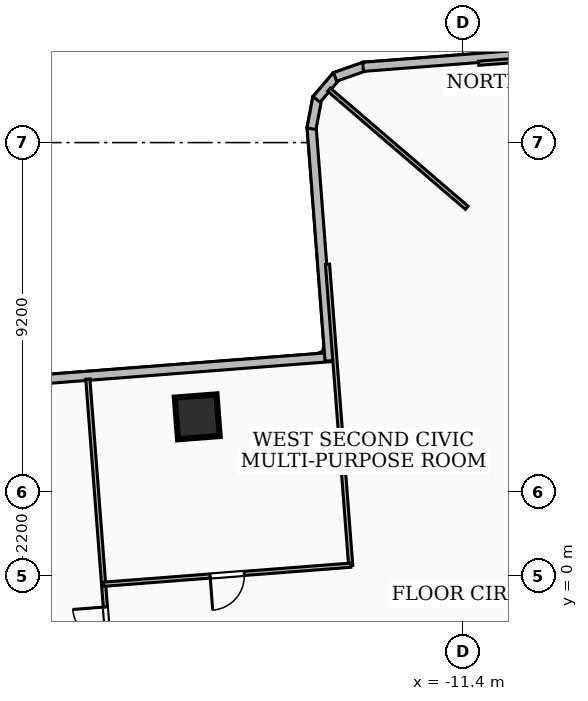
"""IFC4 building model, lengths in metres.
Left out: names, types, materials, properties, quantities, classifications, styles, units other than length and angle.
Written with IfcOpenShell. Run it as: python <this file> out.ifc"""

import sys

from ifc_helpers import new_model, si_unit, direction, frame, frame_2d, origin, origin_2d, place, context, subcontext, project, spatial, rectangle, extrude, element, fill, save


model = new_model("IFC4")
c1 = context("Model", 3, precision=1e-05, world=origin(), true_north=direction((0.0, 1.0)))
c2 = subcontext(c1, "Body", "Model", "MODEL_VIEW")
j1 = project(units=[si_unit("LENGTHUNIT", "METRE"), si_unit("PLANEANGLEUNIT", "RADIAN")], contexts=[c1])
p1 = place(None, origin())
s1 = spatial("IfcSite", under=j1, at=p1, CompositionType="ELEMENT")
p2 = place(p1, origin())
s2 = spatial("IfcBuilding", under=s1, at=p2, CompositionType="ELEMENT")
p3 = place(p2, frame((0.0, 0.0, 56.88)))
s3 = spatial("IfcBuildingStorey", under=s2, at=p3, CompositionType="ELEMENT", Elevation=56.88)
p4 = place(p3, frame((-18.391, 4.184, 0.0), z_axis=(0.0, 0.0, 1.0), x_axis=(0.997052752227, 0.076719028127, 0.0)))
e1 = element("IfcColumn", 1, at=p4, inside=s3, PredefinedType="COLUMN", context=c2, shape_type="SweptSolid", body=[
    extrude(rectangle(XDim=1.1, YDim=1.1, at=origin_2d()), origin(), (0.0, 0.0, 1.0), 3.6),
])
p5 = place(p3, frame((-31.645, 4.465, 0.0), z_axis=(0.0, 0.0, 1.0), x_axis=(0.997051676532, 0.076733006752, 0.0)))
e2 = element("IfcWall", 2, at=p5, inside=s3, PredefinedType="SOLIDWALL", context=c2, shape_type="SweptSolid", body=[
    extrude(rectangle(XDim=16.876, YDim=0.24, at=frame_2d((8.438, 0.0))), origin(), (0.0, 0.0, 1.0), 3.32),
])
p6 = place(p5, frame((1.1, 0.0, 0.85)))
e3 = element("IfcOpeningElement", 3, at=p6, cuts=e2, PredefinedType="OPENING", context=c2, shape_type="SweptSolid", body=[
    extrude(rectangle(XDim=2.4, YDim=1.65, at=frame_2d((1.2, 0.825))), frame((0.0, 0.13, 0.0), z_axis=(0.0, -1.0, 0.0), x_axis=(1.0, 0.0, 0.0)), (0.0, 0.0, 1.0), 0.26),
])
p7 = place(p3, frame((-14.908, 5.657, 0.0), z_axis=(0.0, 0.0, 1.0), x_axis=(-0.076778128006, 0.997048202977, 0.0)))
e4 = element("IfcWall", 4, at=p7, inside=s3, PredefinedType="SOLIDWALL", context=c2, shape_type="SweptSolid", body=[
    extrude(rectangle(XDim=6.175, YDim=0.24, at=frame_2d((3.088, 0.0))), origin(), (0.0, 0.0, 1.0), 3.32),
])
p8 = place(p3, frame((-15.385, 11.764, 0.0), z_axis=(0.0, 0.0, 1.0), x_axis=(0.185263427582, 0.982688894005, 0.0)))
e5 = element("IfcWall", 5, at=p8, inside=s3, PredefinedType="SOLIDWALL", context=c2, shape_type="SweptSolid", body=[
    extrude(rectangle(XDim=0.832, YDim=0.24, at=frame_2d((0.416, 0.0))), origin(), (0.0, 0.0, 1.0), 3.32),
])
p9 = place(p3, frame((-15.252, 12.537, 0.0), z_axis=(0.0, 0.0, 1.0), x_axis=(0.650371098657, 0.759616636226, 0.0)))
e6 = element("IfcWall", 6, at=p9, inside=s3, PredefinedType="SOLIDWALL", context=c2, shape_type="SweptSolid", body=[
    extrude(rectangle(XDim=0.813, YDim=0.24, at=frame_2d((0.407, 0.0))), origin(), (0.0, 0.0, 1.0), 3.32),
])
p10 = place(p3, frame((-14.763, 13.128, 0.0), z_axis=(0.0, 0.0, 1.0), x_axis=(0.943569376564, 0.331174926, 0.0)))
e7 = element("IfcWall", 7, at=p10, inside=s3, PredefinedType="SOLIDWALL", context=c2, shape_type="SweptSolid", body=[
    extrude(rectangle(XDim=0.831, YDim=0.24, at=frame_2d((0.416, 0.0))), origin(), (0.0, 0.0, 1.0), 3.32),
])
p11 = place(p3, frame((-14.028, 13.393, 0.0), z_axis=(0.0, 0.0, 1.0), x_axis=(0.997050032451, 0.076754366588, 0.0)))
e8 = element("IfcWall", 8, at=p11, inside=s3, PredefinedType="SOLIDWALL", context=c2, shape_type="SweptSolid", body=[
    extrude(rectangle(XDim=6.775, YDim=0.24, at=frame_2d((3.388, 0.0))), origin(), (0.0, 0.0, 1.0), 3.32),
])
p12 = place(p3, frame((-11.3, 9.685, 0.0), z_axis=(0.0, 0.0, 1.0), x_axis=(-0.759206042513, 0.650850355313, 0.0)))
e9 = element("IfcWall", 9, at=p12, inside=s3, PredefinedType="PARTITIONING", context=c2, shape_type="SweptSolid", body=[
    extrude(rectangle(XDim=4.772, YDim=0.11, at=frame_2d((2.386, 0.0))), origin(), (0.0, 0.0, 1.0), 3.32),
])
p13 = place(p3, frame((-2.462, 14.143, 0.0), z_axis=(0.0, 0.0, 1.0), x_axis=(-0.997052469631, -0.076722700704, 0.0)))
e10 = element("IfcWall", 10, at=p13, inside=s3, PredefinedType="PARTITIONING", context=c2, shape_type="SweptSolid", body=[
    extrude(rectangle(XDim=8.55, YDim=0.11, at=frame_2d((4.275, 0.0))), origin(), (0.0, 0.0, 1.0), 2.401),
])
p14 = place(p3, frame((-14.963, 8.197, 0.0), z_axis=(0.0, 0.0, 1.0), x_axis=(0.076708240121, -0.99705358226, 0.0)))
e11 = element("IfcWall", 11, at=p14, inside=s3, PredefinedType="PARTITIONING", context=c2, shape_type="SweptSolid", body=[
    extrude(rectangle(XDim=7.95, YDim=0.11, at=frame_2d((3.975, 0.0))), origin(), (0.0, 0.0, 1.0), 2.401),
])
p15 = place(p3, frame((-14.354, 0.28, 0.0), z_axis=(0.0, 0.0, 1.0), x_axis=(-0.997043903764, -0.076833937604, 0.0)))
e12 = element("IfcWall", 12, at=p15, inside=s3, PredefinedType="PARTITIONING", context=c2, shape_type="SweptSolid", body=[
    extrude(rectangle(XDim=6.52, YDim=0.11, at=frame_2d((3.26, 0.0))), origin(), (0.0, 0.0, 1.0), 3.32),
])
p16 = place(p15, frame((2.81, 0.0, 0.0)))
e13 = element("IfcOpeningElement", 13, at=p16, cuts=e12, PredefinedType="OPENING", context=c2, shape_type="SweptSolid", body=[
    extrude(rectangle(XDim=0.9, YDim=2.06, at=frame_2d((0.45, 1.03))), frame((0.0, 0.065, 0.0), z_axis=(0.0, -1.0, 0.0), x_axis=(1.0, 0.0, 0.0)), (0.0, 0.0, 1.0), 0.13),
])
p17 = place(p3, frame((-20.274, -7.773, 0.0), z_axis=(0.0, 0.0, 1.0), x_axis=(-0.076686437656, 0.997055259391, 0.0)))
e14 = element("IfcWall", 14, at=p17, inside=s3, PredefinedType="PARTITIONING", context=c2, shape_type="SweptSolid", body=[
    extrude(rectangle(XDim=12.989, YDim=0.11, at=frame_2d((6.495, 0.0))), origin(), (0.0, 0.0, 1.0), 2.401),
])
p18 = place(p17, frame((6.115, 0.0, 0.0)))
e15 = element("IfcOpeningElement", 15, at=p18, cuts=e14, PredefinedType="OPENING", context=c2, shape_type="SweptSolid", body=[
    extrude(rectangle(XDim=0.86, YDim=2.04, at=frame_2d((0.43, 1.02))), frame((0.0, 0.065, 0.0), z_axis=(0.0, -1.0, 0.0), x_axis=(1.0, 0.0, 0.0)), (0.0, 0.0, 1.0), 0.13),
])
p19 = place(p17, frame((4.915, 0.0, 0.0)))
e16 = element("IfcOpeningElement", 16, at=p19, cuts=e14, PredefinedType="OPENING", context=c2, shape_type="SweptSolid", body=[
    extrude(rectangle(XDim=0.86, YDim=2.04, at=frame_2d((0.43, 1.02))), frame((0.0, 0.065, 0.0), z_axis=(0.0, -1.0, 0.0), x_axis=(1.0, 0.0, 0.0)), (0.0, 0.0, 1.0), 0.13),
])
p20 = place(p16, origin())
e17 = element("IfcDoor", 17, at=p20, inside=s3, OperationType="SINGLE_SWING_RIGHT", PredefinedType="DOOR", context=c2, shape_type="SweptSolid", body=[
    extrude(rectangle(XDim=0.9, YDim=2.06, at=frame_2d((0.45, 1.03))), frame((0.0, 0.025, 0.0), z_axis=(0.0, -1.0, 0.0), x_axis=(1.0, 0.0, 0.0)), (0.0, 0.0, 1.0), 0.05),
])
fill(e13, e17)
p21 = place(p18, origin())
e18 = element("IfcDoor", 18, at=p21, inside=s3, OperationType="SINGLE_SWING_RIGHT", PredefinedType="DOOR", context=c2, shape_type="SweptSolid", body=[
    extrude(rectangle(XDim=0.86, YDim=2.04, at=frame_2d((0.43, 1.02))), frame((0.0, 0.025, 0.0), z_axis=(0.0, -1.0, 0.0), x_axis=(1.0, 0.0, 0.0)), (0.0, 0.0, 1.0), 0.05),
])
fill(e15, e18)
save(model, sys.argv[1])
